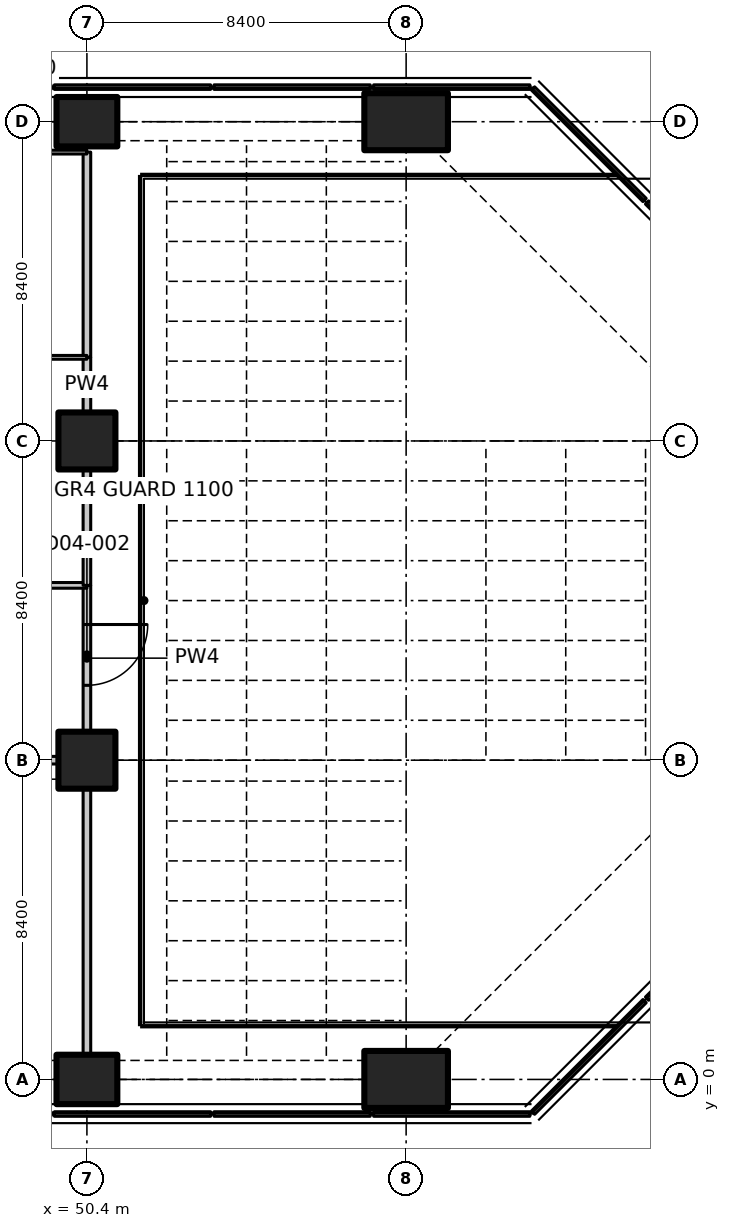
"""IFC4 building model, lengths in metres.
Left out: names, types, materials, properties, quantities, classifications, styles, units other than length and angle.
Written with IfcOpenShell. Run it as: python <this file> out.ifc"""

import sys

from ifc_helpers import new_model, si_unit, direction, frame, frame_2d, origin, origin_2d, place, context, subcontext, project, spatial, polyline, rectangle, outline, extrude, element, fill, save


model = new_model("IFC4")
c1 = context("Model", 3, precision=1e-05, world=origin(), true_north=direction((0.0, 1.0)))
c2 = subcontext(c1, "Body", "Model", "MODEL_VIEW")
j1 = project(units=[si_unit("LENGTHUNIT", "METRE"), si_unit("PLANEANGLEUNIT", "RADIAN")], contexts=[c1])
p1 = place(None, origin())
s1 = spatial("IfcSite", under=j1, at=p1, CompositionType="ELEMENT")
p2 = place(p1, origin())
s2 = spatial("IfcBuilding", under=s1, at=p2, CompositionType="ELEMENT")
p3 = place(p2, frame((0.0, 0.0, 20.0)))
s3 = spatial("IfcBuildingStorey", under=s2, at=p3, CompositionType="ELEMENT", Elevation=20.0)
p4 = place(p3, frame((50.4, 0.0, 0.0), z_axis=(0.0, 0.0, 1.0), x_axis=(0.0, 1.0, 0.0)))
e1 = element("IfcColumn", 1, at=p4, inside=s3, PredefinedType="COLUMN", context=c2, shape_type="SweptSolid", body=[
    extrude(rectangle(XDim=1.3, YDim=1.6, at=origin_2d()), origin(), (0.0, 0.0, 1.0), 7.25),
])
for number, where, z_axis, x_axis in (
    (2, (50.4, 8.4, 0.0), (0.0, 0.0, 1.0), (1.0, 0.0, 0.0)),
    (3, (50.4, 16.8, 0.0), (0.0, 0.0, 1.0), (1.0, 0.0, 0.0)),
):
    element("IfcColumn", number, at=place(p3, frame(where, z_axis=z_axis, x_axis=x_axis)), inside=s3, PredefinedType="COLUMN", context=c2, shape_type="SweptSolid", body=[
        extrude(rectangle(XDim=1.5, YDim=1.5, at=origin_2d()), origin(), (0.0, 0.0, 1.0), 7.25),
    ])
p5 = place(p3, frame((50.4, 25.2, 0.0), z_axis=(0.0, 0.0, 1.0), x_axis=(0.0, 1.0, 0.0)))
e4 = element("IfcColumn", 4, at=p5, inside=s3, PredefinedType="COLUMN", context=c2, shape_type="SweptSolid", body=[
    extrude(rectangle(XDim=1.3, YDim=1.6, at=origin_2d()), origin(), (0.0, 0.0, 1.0), 7.25),
])
for number, where, z_axis, x_axis in (
    (5, (58.8, 0.0, 0.0), (0.0, 0.0, 1.0), (0.0, 1.0, 0.0)),
    (6, (58.8, 25.2, 0.0), (0.0, 0.0, 1.0), (0.0, 1.0, 0.0)),
):
    element("IfcColumn", number, at=place(p3, frame(where, z_axis=z_axis, x_axis=x_axis)), inside=s3, PredefinedType="COLUMN", context=c2, shape_type="SweptSolid", body=[
        extrude(rectangle(XDim=1.5, YDim=2.2, at=origin_2d()), origin(), (0.0, 0.0, 1.0), 7.25),
    ])
p6 = place(p3, origin())
e7 = element("IfcWall", 7, at=p6, inside=s3, PredefinedType="SOLIDWALL", context=c2, shape_type="SweptSolid", body=[
    extrude(outline(polyline([(53.655, -0.97), (53.655, -0.85), (49.545, -0.85), (49.545, -0.97), (53.655, -0.97)])), origin(), (0.0, 0.0, 1.0), 7.5),
])
p7 = place(p3, origin())
e8 = element("IfcWall", 8, at=p7, inside=s3, PredefinedType="SOLIDWALL", context=c2, shape_type="SweptSolid", body=[
    extrude(outline(polyline([(57.855, -0.97), (57.855, -0.85), (53.745, -0.85), (53.745, -0.97), (57.855, -0.97)])), origin(), (0.0, 0.0, 1.0), 7.5),
])
p8 = place(p3, origin())
e9 = element("IfcWall", 9, at=p8, inside=s3, PredefinedType="SOLIDWALL", context=c2, shape_type="SweptSolid", body=[
    extrude(outline(polyline([(62.055, -0.97), (62.055, -0.85), (57.945, -0.85), (57.945, -0.97), (62.055, -0.97)])), origin(), (0.0, 0.0, 1.0), 7.5),
])
p9 = place(p3, origin())
e10 = element("IfcWall", 10, at=p9, inside=s3, PredefinedType="SOLIDWALL", context=c2, shape_type="SweptSolid", body=[
    extrude(outline(polyline([(62.096, -0.833), (65.033, 2.104), (65.118, 2.019), (62.181, -0.918), (62.096, -0.833)])), origin(), (0.0, 0.0, 1.0), 7.5),
])
p10 = place(p3, origin())
e11 = element("IfcWall", 11, at=p10, inside=s3, PredefinedType="SOLIDWALL", context=c2, shape_type="SweptSolid", body=[
    extrude(outline(polyline([(65.096, 2.167), (68.033, 5.104), (68.118, 5.019), (65.181, 2.082), (65.096, 2.167)])), origin(), (0.0, 0.0, 1.0), 7.5),
])
p11 = place(p3, origin())
e12 = element("IfcWall", 12, at=p11, inside=s3, PredefinedType="SOLIDWALL", context=c2, shape_type="SweptSolid", body=[
    extrude(outline(polyline([(68.033, 20.096), (65.096, 23.033), (65.181, 23.118), (68.118, 20.181), (68.033, 20.096)])), origin(), (0.0, 0.0, 1.0), 7.5),
])
p12 = place(p3, origin())
e13 = element("IfcWall", 13, at=p12, inside=s3, PredefinedType="SOLIDWALL", context=c2, shape_type="SweptSolid", body=[
    extrude(outline(polyline([(65.033, 23.096), (62.096, 26.033), (62.181, 26.118), (65.118, 23.181), (65.033, 23.096)])), origin(), (0.0, 0.0, 1.0), 7.5),
])
p13 = place(p3, origin())
e14 = element("IfcWall", 14, at=p13, inside=s3, PredefinedType="SOLIDWALL", context=c2, shape_type="SweptSolid", body=[
    extrude(outline(polyline([(57.945, 26.17), (57.945, 26.05), (62.055, 26.05), (62.055, 26.17), (57.945, 26.17)])), origin(), (0.0, 0.0, 1.0), 7.5),
])
p14 = place(p3, origin())
e15 = element("IfcWall", 15, at=p14, inside=s3, PredefinedType="SOLIDWALL", context=c2, shape_type="SweptSolid", body=[
    extrude(outline(polyline([(53.745, 26.17), (53.745, 26.05), (57.855, 26.05), (57.855, 26.17), (53.745, 26.17)])), origin(), (0.0, 0.0, 1.0), 7.5),
])
p15 = place(p3, origin())
e16 = element("IfcWall", 16, at=p15, inside=s3, PredefinedType="SOLIDWALL", context=c2, shape_type="SweptSolid", body=[
    extrude(outline(polyline([(49.545, 26.17), (49.545, 26.05), (53.655, 26.05), (53.655, 26.17), (49.545, 26.17)])), origin(), (0.0, 0.0, 1.0), 7.5),
])
p16 = place(p3, frame((50.4, 13.0, 0.0), z_axis=(0.0, 0.0, 1.0), x_axis=(0.0, -1.0, 0.0)))
e17 = element("IfcWall", 17, at=p16, inside=s3, PredefinedType="PARTITIONING", context=c2, shape_type="SweptSolid", body=[
    extrude(rectangle(XDim=3.83, YDim=0.2, at=frame_2d((1.915, 0.0))), origin(), (0.0, 0.0, 1.0), 7.23),
])
p17 = place(p16, frame((1.03, 0.0, 0.0)))
e18 = element("IfcOpeningElement", 18, at=p17, cuts=e17, PredefinedType="OPENING", context=c2, shape_type="SweptSolid", body=[
    extrude(rectangle(XDim=1.6, YDim=2.1, at=frame_2d((0.8, 1.05))), frame((0.0, 0.11, 0.0), z_axis=(0.0, -1.0, 0.0), x_axis=(1.0, 0.0, 0.0)), (0.0, 0.0, 1.0), 0.22),
])
p18 = place(p3, frame((49.63, 8.4, 0.0), z_axis=(0.0, 0.0, 1.0), x_axis=(-1.0, 0.0, 0.0)))
e19 = element("IfcWall", 19, at=p18, inside=s3, PredefinedType="PARTITIONING", context=c2, shape_type="SweptSolid", body=[
    extrude(rectangle(XDim=6.86, YDim=0.2, at=frame_2d((3.43, 0.0))), origin(), (0.0, 0.0, 1.0), 7.23),
])
p19 = place(p18, frame((2.7, 0.0, 0.0)))
e20 = element("IfcOpeningElement", 20, at=p19, cuts=e19, PredefinedType="OPENING", context=c2, shape_type="SweptSolid", body=[
    extrude(rectangle(XDim=1.6, YDim=2.1, at=frame_2d((0.8, 1.05))), frame((0.0, 0.11, 0.0), z_axis=(0.0, -1.0, 0.0), x_axis=(1.0, 0.0, 0.0)), (0.0, 0.0, 1.0), 0.22),
])
p20 = place(p3, frame((49.4, 13.0, 0.0), z_axis=(0.0, 0.0, 1.0), x_axis=(1.0, 0.0, 0.0)))
e21 = element("IfcWall", 21, at=p20, inside=s3, PredefinedType="PARTITIONING", context=c2, shape_type="SweptSolid", body=[
    extrude(rectangle(XDim=1.0, YDim=0.15, at=frame_2d((0.5, 0.0))), origin(), (0.0, 0.0, 1.0), 7.23),
])
p21 = place(p3, frame((50.4, 0.67, 0.0), z_axis=(0.0, 0.0, 1.0), x_axis=(0.0, 1.0, 0.0)))
e22 = element("IfcWall", 22, at=p21, inside=s3, PredefinedType="PARTITIONING", context=c2, shape_type="SweptSolid", body=[
    extrude(rectangle(XDim=6.96, YDim=0.2, at=frame_2d((3.48, 0.0))), origin(), (0.0, 0.0, 1.0), 7.23),
])
p22 = place(p3, frame((50.4, 13.0, 0.0), z_axis=(0.0, 0.0, 1.0), x_axis=(0.0, 1.0, 0.0)))
e23 = element("IfcWall", 23, at=p22, inside=s3, PredefinedType="PARTITIONING", context=c2, shape_type="SweptSolid", body=[
    extrude(rectangle(XDim=3.03, YDim=0.2, at=frame_2d((1.515, 0.0))), origin(), (0.0, 0.0, 1.0), 7.23),
])
p23 = place(p3, frame((50.4, 17.57, 0.0), z_axis=(0.0, 0.0, 1.0), x_axis=(0.0, 1.0, 0.0)))
e24 = element("IfcWall", 24, at=p23, inside=s3, PredefinedType="PARTITIONING", context=c2, shape_type="SweptSolid", body=[
    extrude(rectangle(XDim=1.43, YDim=0.2, at=frame_2d((0.715, 0.0))), origin(), (0.0, 0.0, 1.0), 7.23),
])
p24 = place(p3, frame((50.4, 19.0, 0.0), z_axis=(0.0, 0.0, 1.0), x_axis=(0.0, 1.0, 0.0)))
e25 = element("IfcWall", 25, at=p24, inside=s3, PredefinedType="PARTITIONING", context=c2, shape_type="SweptSolid", body=[
    extrude(rectangle(XDim=5.4, YDim=0.2, at=frame_2d((2.7, 0.0))), origin(), (0.0, 0.0, 1.0), 7.23),
])
p25 = place(p3, frame((46.2, 19.0, 0.0), z_axis=(0.0, 0.0, 1.0), x_axis=(1.0, 0.0, 0.0)))
e26 = element("IfcWall", 26, at=p25, inside=s3, PredefinedType="PARTITIONING", context=c2, shape_type="SweptSolid", body=[
    extrude(rectangle(XDim=4.2, YDim=0.1, at=frame_2d((2.1, 0.0))), origin(), (0.0, 0.0, 1.0), 7.23),
])
p26 = place(p3, frame((46.2, 24.4, 0.0), z_axis=(0.0, 0.0, 1.0), x_axis=(1.0, 0.0, 0.0)))
e27 = element("IfcWall", 27, at=p26, inside=s3, PredefinedType="PARTITIONING", context=c2, shape_type="SweptSolid", body=[
    extrude(rectangle(XDim=4.2, YDim=0.1, at=frame_2d((2.1, 0.0))), origin(), (0.0, 0.0, 1.0), 7.23),
])
p27 = place(p26, frame((1.8, 0.0, 0.0)))
e28 = element("IfcOpeningElement", 28, at=p27, cuts=e27, PredefinedType="OPENING", context=c2, shape_type="SweptSolid", body=[
    extrude(rectangle(XDim=0.9, YDim=2.1, at=frame_2d((0.45, 1.05))), frame((0.0, 0.06, 0.0), z_axis=(0.0, -1.0, 0.0), x_axis=(1.0, 0.0, 0.0)), (0.0, 0.0, 1.0), 0.12),
])
p28 = place(p17, origin())
e29 = element("IfcDoor", 29, at=p28, inside=s3, OperationType="DOUBLE_DOOR_SINGLE_SWING", PredefinedType="DOOR", context=c2, shape_type="SweptSolid", body=[
    extrude(rectangle(XDim=1.6, YDim=2.1, at=frame_2d((0.8, 1.05))), frame((0.0, 0.025, 0.0), z_axis=(0.0, -1.0, 0.0), x_axis=(1.0, 0.0, 0.0)), (0.0, 0.0, 1.0), 0.05),
])
fill(e18, e29)
save(model, sys.argv[1])
